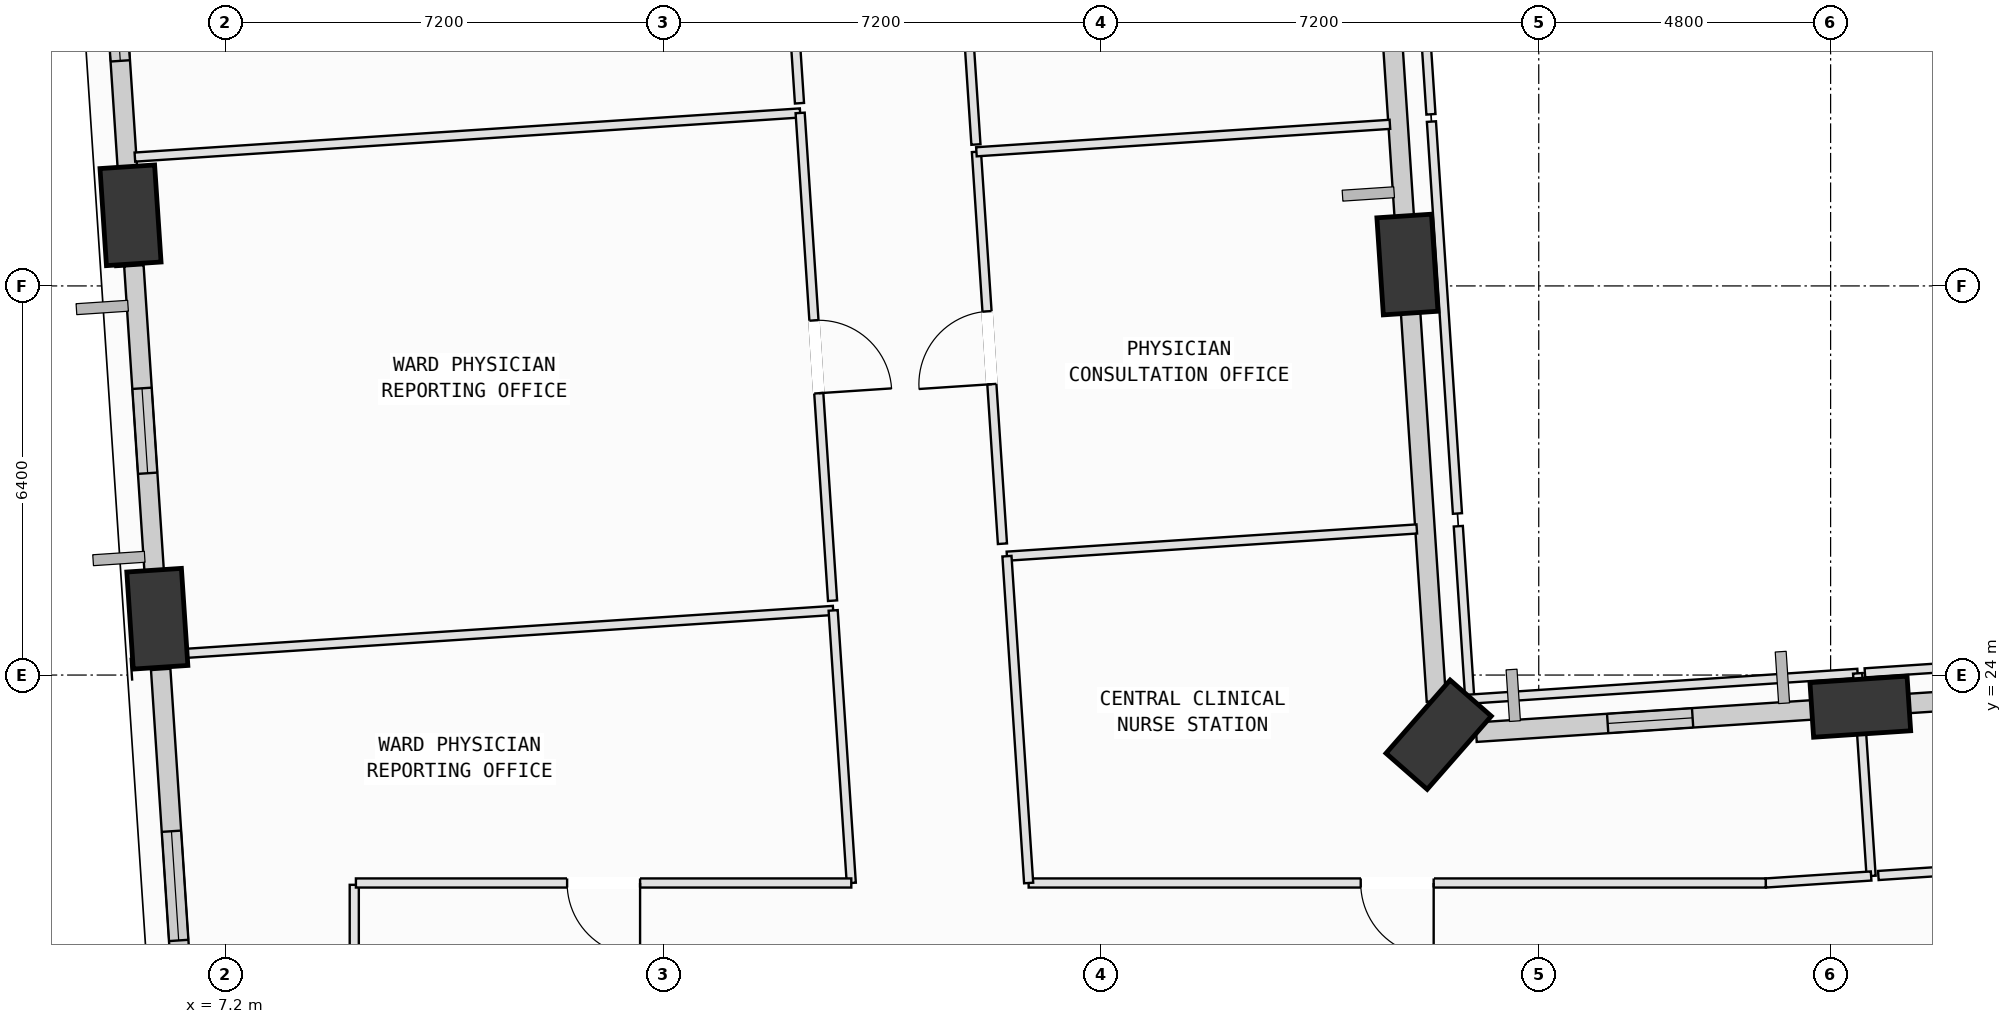
"""IFC4 building model, lengths in metres.
Left out: names, types, materials, properties, quantities, classifications, styles, units other than length and angle.
Written with IfcOpenShell. Run it as: python <this file> out.ifc"""

import sys

from ifc_helpers import new_model, si_unit, direction, frame, frame_2d, origin, origin_2d, place, context, subcontext, project, spatial, rectangle, extrude, element, fill, save


model = new_model("IFC4")
c1 = context("Model", 3, precision=1e-05, world=origin(), true_north=direction((0.0, 1.0)))
c2 = subcontext(c1, "Body", "Model", "MODEL_VIEW")
j1 = project(units=[si_unit("LENGTHUNIT", "METRE"), si_unit("PLANEANGLEUNIT", "RADIAN")], contexts=[c1])
p1 = place(None, origin())
s1 = spatial("IfcSite", under=j1, at=p1, CompositionType="ELEMENT")
p2 = place(p1, origin())
s2 = spatial("IfcBuilding", under=s1, at=p2, CompositionType="ELEMENT")
p3 = place(p2, frame((0.0, 0.0, 39.0)))
s3 = spatial("IfcBuildingStorey", under=s2, at=p3, CompositionType="ELEMENT", Elevation=39.0)
p4 = place(p3, frame((34.089, 23.479, 0.002), z_axis=(0.005436682512, 0.002076934892, 0.999983064269), x_axis=(-0.417992563266, 0.90845036644, 0.000385707127)))
e1 = element("IfcColumn", 1, at=p4, inside=s3, PredefinedType="COLUMN", context=c2, shape_type="SweptSolid", body=[
    extrude(rectangle(XDim=1.6, YDim=0.9, at=origin_2d()), origin(), (0.0, 0.0, 1.0), 3.997),
])
p5 = place(p3, frame((27.154, 23.019, 0.002), z_axis=(0.007632990073, -0.026623869374, 0.999616379939), x_axis=(0.425899087039, 0.904530648849, 0.020839216678)))
e2 = element("IfcColumn", 2, at=p5, inside=s3, PredefinedType="COLUMN", context=c2, shape_type="SweptSolid", body=[
    extrude(rectangle(XDim=1.6, YDim=0.9, at=origin_2d()), origin(), (0.0, 0.0, 1.0), 3.998),
])
p6 = place(p3, frame((26.64, 30.752, 0.002), z_axis=(-0.024417379694, -0.028995638386, 0.999281263971), x_axis=(0.591563998635, 0.805370344302, 0.037823855406)))
e3 = element("IfcColumn", 3, at=p6, inside=s3, PredefinedType="COLUMN", context=c2, shape_type="SweptSolid", body=[
    extrude(rectangle(XDim=1.6, YDim=0.9, at=origin_2d()), origin(), (0.0, 0.0, 1.0), 4.0),
])
p7 = place(p3, frame((5.64, 31.562, 0.002), z_axis=(-0.026871346322, -0.115310224283, 0.992966002904), x_axis=(0.160317923428, 0.979970009184, 0.118139512983)))
e4 = element("IfcColumn", 4, at=p7, inside=s3, PredefinedType="COLUMN", context=c2, shape_type="SweptSolid", body=[
    extrude(rectangle(XDim=1.6, YDim=0.9, at=origin_2d()), origin(), (0.0, 0.0, 1.0), 4.025),
])
p8 = place(p3, frame((6.081, 24.926, 0.002), z_axis=(0.000424857224, -0.113315491116, 0.993558966025), x_axis=(-0.069990399441, 0.991119146086, 0.113067158127)))
e5 = element("IfcColumn", 5, at=p8, inside=s3, PredefinedType="COLUMN", context=c2, shape_type="SweptSolid", body=[
    extrude(rectangle(XDim=1.6, YDim=0.9, at=origin_2d()), origin(), (0.0, 0.0, 1.0), 4.022),
])
p9 = place(p3, frame((34.706, 23.521, 0.0), z_axis=(0.0, 0.0, 1.0), x_axis=(0.997802086271, 0.066264595619, 0.0)))
e6 = element("IfcWall", 6, at=p9, inside=s3, PredefinedType="SOLIDWALL", context=c2, shape_type="SweptSolid", body=[
    extrude(rectangle(XDim=5.987, YDim=0.32, at=frame_2d((2.994, 0.0))), origin(), (0.0, 0.0, 1.0), 3.165),
])
p10 = place(p3, frame((27.77, 23.06, 0.0), z_axis=(0.0, 0.0, 1.0), x_axis=(0.997801886961, 0.066267596741, 0.0)))
e7 = element("IfcWall", 7, at=p10, inside=s3, PredefinedType="SOLIDWALL", context=c2, shape_type="SweptSolid", body=[
    extrude(rectangle(XDim=5.736, YDim=0.32, at=frame_2d((2.868, 0.0))), origin(), (0.0, 0.0, 1.0), 3.165),
])
p11 = place(p10, frame((2.169, 0.0, 0.75)))
e8 = element("IfcOpeningElement", 8, at=p11, cuts=e7, PredefinedType="OPENING", context=c2, shape_type="SweptSolid", body=[
    extrude(rectangle(XDim=1.4, YDim=1.85, at=frame_2d((0.7, 0.925))), frame((0.0, 0.17, 0.0), z_axis=(0.0, -1.0, 0.0), x_axis=(1.0, 0.0, 0.0)), (0.0, 0.0, 1.0), 0.34),
])
p12 = place(p3, frame((27.117, 23.571, 0.0), z_axis=(0.0, 0.0, 1.0), x_axis=(-0.066263654845, 0.997802148748, 0.0)))
e9 = element("IfcWall", 9, at=p12, inside=s3, PredefinedType="SOLIDWALL", context=c2, shape_type="SweptSolid", body=[
    extrude(rectangle(XDim=6.536, YDim=0.32, at=frame_2d((3.268, 0.0))), origin(), (0.0, 0.0, 1.0), 3.165),
])
p13 = place(p3, frame((26.604, 31.302, 0.0), z_axis=(0.0, 0.0, 1.0), x_axis=(-0.066281214276, 0.997800982478, 0.0)))
e10 = element("IfcWall", 10, at=p13, inside=s3, PredefinedType="SOLIDWALL", context=c2, shape_type="SweptSolid", body=[
    extrude(rectangle(XDim=5.997, YDim=0.32, at=frame_2d((2.998, 0.0))), origin(), (0.0, 0.0, 1.0), 3.165),
])
p14 = place(p13, frame((3.446, 0.0, 0.75)))
e11 = element("IfcOpeningElement", 11, at=p14, cuts=e10, PredefinedType="OPENING", context=c2, shape_type="SweptSolid", body=[
    extrude(rectangle(XDim=1.2, YDim=1.75, at=frame_2d((0.6, 0.875))), frame((0.0, 0.17, 0.0), z_axis=(0.0, -1.0, 0.0), x_axis=(1.0, 0.0, 0.0)), (0.0, 0.0, 1.0), 0.34),
])
p15 = place(p3, frame((5.615, 31.937, 0.0), z_axis=(0.0, 0.0, 1.0), x_axis=(-0.066272972222, 0.997801529941, 0.0)))
e12 = element("IfcWall", 12, at=p15, inside=s3, PredefinedType="SOLIDWALL", context=c2, shape_type="SweptSolid", body=[
    extrude(rectangle(XDim=5.401, YDim=0.32, at=frame_2d((2.7, 0.0))), origin(), (0.0, 0.0, 1.0), 3.165),
])
p16 = place(p15, frame((2.17, 0.0, 0.75)))
e13 = element("IfcOpeningElement", 13, at=p16, cuts=e12, PredefinedType="OPENING", context=c2, shape_type="SweptSolid", body=[
    extrude(rectangle(XDim=2.0, YDim=1.95, at=frame_2d((1.0, 0.975))), frame((0.0, 0.17, 0.0), z_axis=(0.0, -1.0, 0.0), x_axis=(1.0, 0.0, 0.0)), (0.0, 0.0, 1.0), 0.34),
])
p17 = place(p3, frame((6.056, 25.306, 0.0), z_axis=(0.0, 0.0, 1.0), x_axis=(-0.066265726367, 0.997802011177, 0.0)))
e14 = element("IfcWall", 14, at=p17, inside=s3, PredefinedType="SOLIDWALL", context=c2, shape_type="SweptSolid", body=[
    extrude(rectangle(XDim=5.438, YDim=0.32, at=frame_2d((2.719, 0.0))), origin(), (0.0, 0.0, 1.0), 3.165),
])
p18 = place(p17, frame((2.018, 0.0, 0.75)))
e15 = element("IfcOpeningElement", 15, at=p18, cuts=e14, PredefinedType="OPENING", context=c2, shape_type="SweptSolid", body=[
    extrude(rectangle(XDim=1.4, YDim=1.85, at=frame_2d((0.7, 0.925))), frame((0.0, 0.17, 0.0), z_axis=(0.0, -1.0, 0.0), x_axis=(1.0, 0.0, 0.0)), (0.0, 0.0, 1.0), 0.34),
])
p19 = place(p3, frame((6.609, 16.972, 0.0), z_axis=(0.0, 0.0, 1.0), x_axis=(-0.066266966199, 0.997801928837, 0.0)))
e16 = element("IfcWall", 16, at=p19, inside=s3, PredefinedType="SOLIDWALL", context=c2, shape_type="SweptSolid", body=[
    extrude(rectangle(XDim=7.136, YDim=0.32, at=frame_2d((3.568, 0.0))), origin(), (0.0, 0.0, 1.0), 3.165),
])
p20 = place(p19, frame((2.669, 0.0, 0.75)))
e17 = element("IfcOpeningElement", 17, at=p20, cuts=e16, PredefinedType="OPENING", context=c2, shape_type="SweptSolid", body=[
    extrude(rectangle(XDim=1.8, YDim=2.05, at=frame_2d((0.9, 1.025))), frame((0.0, 0.17, 0.0), z_axis=(0.0, -1.0, 0.0), x_axis=(1.0, 0.0, 0.0)), (0.0, 0.0, 1.0), 0.34),
])
p21 = place(p3, frame((9.32, 20.55, 0.0), z_axis=(0.0, 0.0, 1.0), x_axis=(0.0, -1.0, 0.0)))
e18 = element("IfcWall", 18, at=p21, inside=s3, PredefinedType="PARTITIONING", context=c2, shape_type="SweptSolid", body=[
    extrude(rectangle(XDim=1.542, YDim=0.15, at=frame_2d((0.771, 0.0))), origin(), (0.0, 0.0, 1.0), 3.78),
])
p22 = place(p3, frame((5.891, 24.313, 0.0), z_axis=(0.0, 0.0, 1.0), x_axis=(0.997806559187, 0.066197208721, 0.0)))
e19 = element("IfcWall", 19, at=p22, inside=s3, PredefinedType="PARTITIONING", context=c2, shape_type="SweptSolid", body=[
    extrude(rectangle(XDim=11.33, YDim=0.15, at=frame_2d((5.665, 0.0))), origin(), (0.0, 0.0, 1.0), 3.78),
])
p23 = place(p3, frame((17.196, 25.063, 0.0), z_axis=(0.0, 0.0, 1.0), x_axis=(0.066295395341, -0.997800040367, 0.0)))
e20 = element("IfcWall", 20, at=p23, inside=s3, PredefinedType="PARTITIONING", context=c2, shape_type="SweptSolid", body=[
    extrude(rectangle(XDim=4.493, YDim=0.15, at=frame_2d((2.246, 0.0))), origin(), (0.0, 0.0, 1.0), 3.78),
])
p24 = place(p3, frame((17.494, 20.58, 0.0), z_axis=(0.0, 0.0, 1.0), x_axis=(-1.0, 0.0, 0.0)))
e21 = element("IfcWall", 21, at=p24, inside=s3, PredefinedType="PARTITIONING", context=c2, shape_type="SweptSolid", body=[
    extrude(rectangle(XDim=8.147, YDim=0.15, at=frame_2d((4.073, 0.0))), origin(), (0.0, 0.0, 1.0), 3.78),
])
p25 = place(p24, frame((3.473, 0.0, 0.0)))
e22 = element("IfcOpeningElement", 22, at=p25, cuts=e21, PredefinedType="OPENING", context=c2, shape_type="SweptSolid", body=[
    extrude(rectangle(XDim=1.2, YDim=2.15, at=frame_2d((0.6, 1.075))), frame((0.0, 0.085, 0.0), z_axis=(0.0, -1.0, 0.0), x_axis=(1.0, 0.0, 0.0)), (0.0, 0.0, 1.0), 0.17),
])
p26 = place(p3, frame((5.712, 32.519, 0.0), z_axis=(0.0, 0.0, 1.0), x_axis=(0.997805307983, 0.066216065736, 0.0)))
e23 = element("IfcWall", 23, at=p26, inside=s3, PredefinedType="PARTITIONING", context=c2, shape_type="SweptSolid", body=[
    extrude(rectangle(XDim=10.965, YDim=0.15, at=frame_2d((5.483, 0.0))), origin(), (0.0, 0.0, 1.0), 3.365),
])
p27 = place(p3, frame((16.653, 33.245, 0.0), z_axis=(0.0, 0.0, 1.0), x_axis=(0.066289247384, -0.997800448828, 0.0)))
e24 = element("IfcWall", 24, at=p27, inside=s3, PredefinedType="PARTITIONING", context=c2, shape_type="SweptSolid", body=[
    extrude(rectangle(XDim=8.04, YDim=0.15, at=frame_2d((4.02, 0.0))), origin(), (0.0, 0.0, 1.0), 3.78),
])
p28 = place(p27, frame((3.42, 0.0, 0.0)))
e25 = element("IfcOpeningElement", 25, at=p28, cuts=e24, PredefinedType="OPENING", context=c2, shape_type="SweptSolid", body=[
    extrude(rectangle(XDim=1.2, YDim=2.15, at=frame_2d((0.6, 1.075))), frame((0.0, 0.085, 0.0), z_axis=(0.0, -1.0, 0.0), x_axis=(1.0, 0.0, 0.0)), (0.0, 0.0, 1.0), 0.17),
])
p29 = place(p3, frame((5.881, 24.472, 0.0), z_axis=(0.0, 0.0, 1.0), x_axis=(-0.066103977406, 0.997812740032, 0.0)))
e26 = element("IfcWall", 26, at=p29, inside=s3, PredefinedType="PARTITIONING", context=c2, shape_type="SweptSolid", body=[
    extrude(rectangle(XDim=0.82, YDim=0.15, at=frame_2d((0.41, 0.0))), origin(), (0.0, 0.0, 1.0), 3.165),
])
p30 = place(p3, frame((5.466, 30.716, 0.0), z_axis=(0.0, 0.0, 1.0), x_axis=(-0.066250887221, 0.997802996559, 0.0)))
e27 = element("IfcWall", 27, at=p30, inside=s3, PredefinedType="PARTITIONING", context=c2, shape_type="SweptSolid", body=[
    extrude(rectangle(XDim=1.209, YDim=0.15, at=frame_2d((0.604, 0.0))), origin(), (0.0, 0.0, 1.0), 3.165),
])
p31 = place(p3, frame((16.11, 41.427, 0.0), z_axis=(0.0, 0.0, 1.0), x_axis=(0.066170320126, -0.997808342686, 0.0)))
e28 = element("IfcWall", 28, at=p31, inside=s3, PredefinedType="PARTITIONING", context=c2, shape_type="SweptSolid", body=[
    extrude(rectangle(XDim=8.04, YDim=0.15, at=frame_2d((4.02, 0.0))), origin(), (0.0, 0.0, 1.0), 3.78),
])
p32 = place(p31, frame((3.42, 0.0, 0.0)))
e29 = element("IfcOpeningElement", 29, at=p32, cuts=e28, PredefinedType="OPENING", context=c2, shape_type="SweptSolid", body=[
    extrude(rectangle(XDim=1.2, YDim=2.15, at=frame_2d((0.6, 1.075))), frame((0.0, 0.085, 0.0), z_axis=(0.0, -1.0, 0.0), x_axis=(1.0, 0.0, 0.0)), (0.0, 0.0, 1.0), 0.17),
])
p33 = place(p3, frame((20.054, 25.955, 0.0), z_axis=(0.0, 0.0, 1.0), x_axis=(0.997798252278, 0.066322302059, 0.0)))
e30 = element("IfcWall", 30, at=p33, inside=s3, PredefinedType="PARTITIONING", context=c2, shape_type="SweptSolid", body=[
    extrude(rectangle(XDim=6.755, YDim=0.15, at=frame_2d((3.377, 0.0))), origin(), (0.0, 0.0, 1.0), 3.78),
])
p34 = place(p3, frame((27.477, 26.448, 0.0), z_axis=(0.0, 0.0, 1.0), x_axis=(0.066297290222, -0.997799914466, 0.0)))
e31 = element("IfcWall", 31, at=p34, inside=s3, PredefinedType="PARTITIONING", context=c2, shape_type="SweptSolid", body=[
    extrude(rectangle(XDim=2.85, YDim=0.15, at=frame_2d((1.425, 0.0))), origin(), (0.0, 0.0, 1.0), 3.78),
])
p35 = place(p3, frame((27.666, 23.604, 0.0), z_axis=(0.0, 0.0, 1.0), x_axis=(0.99779680372, 0.066344091566, 0.0)))
e32 = element("IfcWall", 32, at=p35, inside=s3, PredefinedType="PARTITIONING", context=c2, shape_type="SweptSolid", body=[
    extrude(rectangle(XDim=6.392, YDim=0.15, at=frame_2d((3.196, 0.0))), origin(), (0.0, 0.0, 1.0), 3.78),
])
p36 = place(p3, frame((34.044, 24.028, 0.0), z_axis=(0.0, 0.0, 1.0), x_axis=(0.066509308686, -0.997785804598, 0.0)))
e33 = element("IfcWall", 33, at=p36, inside=s3, PredefinedType="PARTITIONING", context=c2, shape_type="SweptSolid", body=[
    extrude(rectangle(XDim=3.34, YDim=0.15, at=frame_2d((1.67, 0.0))), origin(), (0.0, 0.0, 1.0), 2.865),
])
p37 = place(p3, frame((34.266, 20.695, 0.0), z_axis=(0.0, 0.0, 1.0), x_axis=(-0.997806253018, -0.06620182352, 0.0)))
e34 = element("IfcWall", 34, at=p37, inside=s3, PredefinedType="PARTITIONING", context=c2, shape_type="SweptSolid", body=[
    extrude(rectangle(XDim=1.737, YDim=0.15, at=frame_2d((0.869, 0.0))), origin(), (0.0, 0.0, 1.0), 3.78),
])
p38 = place(p3, frame((32.533, 20.58, 0.0), z_axis=(0.0, 0.0, 1.0), x_axis=(-1.0, 0.0, 0.0)))
e35 = element("IfcWall", 35, at=p38, inside=s3, PredefinedType="PARTITIONING", context=c2, shape_type="SweptSolid", body=[
    extrude(rectangle(XDim=12.122, YDim=0.15, at=frame_2d((6.061, 0.0))), origin(), (0.0, 0.0, 1.0), 3.78),
])
p39 = place(p38, frame((5.461, 0.0, 0.0)))
e36 = element("IfcOpeningElement", 36, at=p39, cuts=e35, PredefinedType="OPENING", context=c2, shape_type="SweptSolid", body=[
    extrude(rectangle(XDim=1.2, YDim=2.15, at=frame_2d((0.6, 1.075))), frame((0.0, 0.085, 0.0), z_axis=(0.0, -1.0, 0.0), x_axis=(1.0, 0.0, 0.0)), (0.0, 0.0, 1.0), 0.17),
])
p40 = place(p3, frame((20.411, 20.58, 0.0), z_axis=(0.0, 0.0, 1.0), x_axis=(-0.066260313675, 0.997802370628, 0.0)))
e37 = element("IfcWall", 37, at=p40, inside=s3, PredefinedType="PARTITIONING", context=c2, shape_type="SweptSolid", body=[
    extrude(rectangle(XDim=5.387, YDim=0.15, at=frame_2d((2.693, 0.0))), origin(), (0.0, 0.0, 1.0), 3.78),
])
p41 = place(p3, frame((49.057, 21.678, 0.0), z_axis=(0.0, 0.0, 1.0), x_axis=(-0.99779880156, -0.066314037763, 0.0)))
e38 = element("IfcWall", 38, at=p41, inside=s3, PredefinedType="PARTITIONING", context=c2, shape_type="SweptSolid", body=[
    extrude(rectangle(XDim=14.704, YDim=0.15, at=frame_2d((7.352, 0.0))), origin(), (0.0, 0.0, 1.0), 3.78),
])
p42 = place(p41, frame((6.752, 0.0, 0.0)))
e39 = element("IfcOpeningElement", 39, at=p42, cuts=e38, PredefinedType="OPENING", context=c2, shape_type="SweptSolid", body=[
    extrude(rectangle(XDim=1.2, YDim=2.15, at=frame_2d((0.6, 1.075))), frame((0.0, 0.085, 0.0), z_axis=(0.0, -1.0, 0.0), x_axis=(1.0, 0.0, 0.0)), (0.0, 0.0, 1.0), 0.17),
])
p43 = place(p3, frame((34.164, 24.036, 0.0), z_axis=(0.0, 0.0, 1.0), x_axis=(0.997803193852, 0.066247915726, 0.0)))
e40 = element("IfcWall", 40, at=p43, inside=s3, PredefinedType="PARTITIONING", context=c2, shape_type="SweptSolid", body=[
    extrude(rectangle(XDim=14.704, YDim=0.15, at=frame_2d((7.352, 0.0))), origin(), (0.0, 0.0, 1.0), 3.165),
])
p44 = place(p3, frame((19.98, 26.16, 0.0), z_axis=(0.0, 0.0, 1.0), x_axis=(-0.066248114822, 0.997803180634, 0.0)))
e41 = element("IfcWall", 41, at=p44, inside=s3, PredefinedType="PARTITIONING", context=c2, shape_type="SweptSolid", body=[
    extrude(rectangle(XDim=6.46, YDim=0.15, at=frame_2d((3.23, 0.0))), origin(), (0.0, 0.0, 1.0), 3.78),
])
p45 = place(p44, frame((2.63, 0.0, 0.0)))
e42 = element("IfcOpeningElement", 42, at=p45, cuts=e41, PredefinedType="OPENING", context=c2, shape_type="SweptSolid", body=[
    extrude(rectangle(XDim=1.2, YDim=2.15, at=frame_2d((0.6, 1.075))), frame((0.0, 0.085, 0.0), z_axis=(0.0, -1.0, 0.0), x_axis=(1.0, 0.0, 0.0)), (0.0, 0.0, 1.0), 0.17),
])
p46 = place(p3, frame((19.552, 32.606, 0.0), z_axis=(0.0, 0.0, 1.0), x_axis=(0.997796714123, 0.066345439075, 0.0)))
e43 = element("IfcWall", 43, at=p46, inside=s3, PredefinedType="PARTITIONING", context=c2, shape_type="SweptSolid", body=[
    extrude(rectangle(XDim=6.815, YDim=0.15, at=frame_2d((3.408, 0.0))), origin(), (0.0, 0.0, 1.0), 3.365),
])
p47 = place(p3, frame((27.035, 33.103, 0.0), z_axis=(0.0, 0.0, 1.0), x_axis=(0.066248114822, -0.997803180634, 0.0)))
e44 = element("IfcWall", 44, at=p47, inside=s3, PredefinedType="PARTITIONING", context=c2, shape_type="SweptSolid", body=[
    extrude(rectangle(XDim=6.46, YDim=0.15, at=frame_2d((3.23, 0.0))), origin(), (0.0, 0.0, 1.0), 3.78),
])
p48 = place(p3, frame((19.544, 32.726, 0.0), z_axis=(0.0, 0.0, 1.0), x_axis=(-0.066301410689, 0.99779964068, 0.0)))
e45 = element("IfcWall", 45, at=p48, inside=s3, PredefinedType="PARTITIONING", context=c2, shape_type="SweptSolid", body=[
    extrude(rectangle(XDim=8.34, YDim=0.15, at=frame_2d((4.17, 0.0))), origin(), (0.0, 0.0, 1.0), 3.78),
])
p49 = place(p48, frame((3.71, 0.0, 0.0)))
e46 = element("IfcOpeningElement", 46, at=p49, cuts=e45, PredefinedType="OPENING", context=c2, shape_type="SweptSolid", body=[
    extrude(rectangle(XDim=0.92, YDim=2.1, at=frame_2d((0.46, 1.05))), frame((0.0, 0.085, 0.0), z_axis=(0.0, -1.0, 0.0), x_axis=(1.0, 0.0, 0.0)), (0.0, 0.0, 1.0), 0.17),
])
p50 = place(p3, frame((26.475, 41.545, 0.0), z_axis=(0.0, 0.0, 1.0), x_axis=(0.066184835455, -0.997807379987, 0.0)))
e47 = element("IfcWall", 47, at=p50, inside=s3, PredefinedType="PARTITIONING", context=c2, shape_type="SweptSolid", body=[
    extrude(rectangle(XDim=8.34, YDim=0.15, at=frame_2d((4.17, 0.0))), origin(), (0.0, 0.0, 1.0), 3.78),
])
p51 = place(p11, origin())
e48 = element("IfcWindow", 48, at=p51, inside=s3, PartitioningType="SINGLE_PANEL", PredefinedType="WINDOW", context=c2, shape_type="SweptSolid", body=[
    extrude(rectangle(XDim=1.4, YDim=1.85, at=frame_2d((0.7, 0.925))), frame((0.0, 0.03, 0.0), z_axis=(0.0, -1.0, 0.0), x_axis=(1.0, 0.0, 0.0)), (0.0, 0.0, 1.0), 0.06),
])
fill(e8, e48)
p52 = place(p16, origin())
e49 = element("IfcWindow", 49, at=p52, inside=s3, PartitioningType="SINGLE_PANEL", PredefinedType="WINDOW", context=c2, shape_type="SweptSolid", body=[
    extrude(rectangle(XDim=2.0, YDim=1.95, at=frame_2d((1.0, 0.975))), frame((0.0, 0.03, 0.0), z_axis=(0.0, -1.0, 0.0), x_axis=(1.0, 0.0, 0.0)), (0.0, 0.0, 1.0), 0.06),
])
fill(e13, e49)
p53 = place(p18, origin())
e50 = element("IfcWindow", 50, at=p53, inside=s3, PartitioningType="SINGLE_PANEL", PredefinedType="WINDOW", context=c2, shape_type="SweptSolid", body=[
    extrude(rectangle(XDim=1.4, YDim=1.85, at=frame_2d((0.7, 0.925))), frame((0.0, 0.03, 0.0), z_axis=(0.0, -1.0, 0.0), x_axis=(1.0, 0.0, 0.0)), (0.0, 0.0, 1.0), 0.06),
])
fill(e15, e50)
p54 = place(p20, origin())
e51 = element("IfcWindow", 51, at=p54, inside=s3, PartitioningType="SINGLE_PANEL", PredefinedType="WINDOW", context=c2, shape_type="SweptSolid", body=[
    extrude(rectangle(XDim=1.8, YDim=2.05, at=frame_2d((0.9, 1.025))), frame((0.0, 0.03, 0.0), z_axis=(0.0, -1.0, 0.0), x_axis=(1.0, 0.0, 0.0)), (0.0, 0.0, 1.0), 0.06),
])
fill(e17, e51)
p55 = place(p25, origin())
e52 = element("IfcDoor", 52, at=p55, inside=s3, OperationType="SINGLE_SWING_LEFT", PredefinedType="DOOR", context=c2, shape_type="SweptSolid", body=[
    extrude(rectangle(XDim=1.2, YDim=2.15, at=frame_2d((0.6, 1.075))), frame((0.0, 0.025, 0.0), z_axis=(0.0, -1.0, 0.0), x_axis=(1.0, 0.0, 0.0)), (0.0, 0.0, 1.0), 0.05),
])
fill(e22, e52)
p56 = place(p28, origin())
e53 = element("IfcDoor", 53, at=p56, inside=s3, OperationType="SINGLE_SWING_RIGHT", PredefinedType="DOOR", context=c2, shape_type="SweptSolid", body=[
    extrude(rectangle(XDim=1.2, YDim=2.15, at=frame_2d((0.6, 1.075))), frame((0.0, 0.025, 0.0), z_axis=(0.0, -1.0, 0.0), x_axis=(1.0, 0.0, 0.0)), (0.0, 0.0, 1.0), 0.05),
])
fill(e25, e53)
p57 = place(p39, origin())
e54 = element("IfcDoor", 54, at=p57, inside=s3, OperationType="SINGLE_SWING_LEFT", PredefinedType="DOOR", context=c2, shape_type="SweptSolid", body=[
    extrude(rectangle(XDim=1.2, YDim=2.15, at=frame_2d((0.6, 1.075))), frame((0.0, 0.025, 0.0), z_axis=(0.0, -1.0, 0.0), x_axis=(1.0, 0.0, 0.0)), (0.0, 0.0, 1.0), 0.05),
])
fill(e36, e54)
p58 = place(p45, origin())
e55 = element("IfcDoor", 55, at=p58, inside=s3, OperationType="SINGLE_SWING_LEFT", PredefinedType="DOOR", context=c2, shape_type="SweptSolid", body=[
    extrude(rectangle(XDim=1.2, YDim=2.15, at=frame_2d((0.6, 1.075))), frame((0.0, 0.025, 0.0), z_axis=(0.0, -1.0, 0.0), x_axis=(1.0, 0.0, 0.0)), (0.0, 0.0, 1.0), 0.05),
])
fill(e42, e55)
save(model, sys.argv[1])
